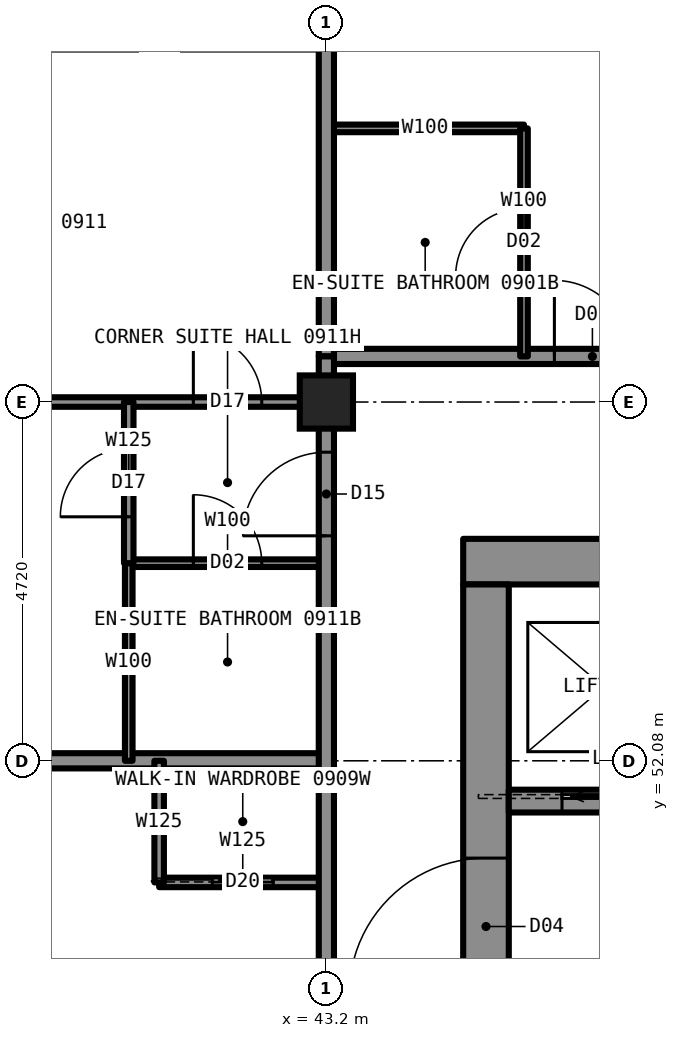
"""IFC4 building model, lengths in metres.
Left out: names, types, materials, properties, quantities, classifications, styles, units other than length and angle.
Written with IfcOpenShell. Run it as: python <this file> out.ifc"""

import sys

from ifc_helpers import new_model, si_unit, direction, frame, frame_2d, origin, origin_2d, place, context, subcontext, project, spatial, rectangle, hollow_rectangle, extrude, element, fill, save


model = new_model("IFC4")
c1 = context("Model", 3, precision=1e-05, world=origin(), true_north=direction((0.0, 1.0)))
c2 = subcontext(c1, "Body", "Model", "MODEL_VIEW")
j1 = project(units=[si_unit("LENGTHUNIT", "METRE"), si_unit("PLANEANGLEUNIT", "RADIAN")], contexts=[c1])
p1 = place(None, origin())
s1 = spatial("IfcSite", under=j1, at=p1, CompositionType="ELEMENT")
p2 = place(p1, origin())
s2 = spatial("IfcBuilding", under=s1, at=p2, CompositionType="ELEMENT")
p3 = place(p2, frame((0.0, 0.0, 39.0)))
s3 = spatial("IfcBuildingStorey", under=s2, at=p3, CompositionType="ELEMENT", Elevation=39.0)
p4 = place(p3, frame((43.2, 56.8, 0.0), z_axis=(0.0, 0.0, 1.0), x_axis=(1.0, 0.0, 0.0)))
e1 = element("IfcColumn", 1, at=p4, inside=s3, PredefinedType="COLUMN", context=c2, shape_type="SweptSolid", body=[
    extrude(hollow_rectangle(XDim=0.7, YDim=0.7, WallThickness=0.06, at=origin_2d()), origin(), (0.0, 0.0, 1.0), 3.5),
])
p5 = place(p3, frame((45.0, 54.7, 0.0), z_axis=(0.0, 0.0, 1.0), x_axis=(1.0, 0.0, 0.0)))
e2 = element("IfcWall", 2, at=p5, inside=s3, PredefinedType="SHEAR", context=c2, shape_type="SweptSolid", body=[
    extrude(rectangle(XDim=20.0, YDim=0.6, at=frame_2d((10.0, 0.0))), origin(), (0.0, 0.0, 1.0), 3.5),
])
p6 = place(p3, frame((45.3, 35.6, 0.0), z_axis=(0.0, 0.0, 1.0), x_axis=(0.0, 1.0, 0.0)))
e3 = element("IfcWall", 3, at=p6, inside=s3, PredefinedType="SHEAR", context=c2, shape_type="SweptSolid", body=[
    extrude(rectangle(XDim=18.8, YDim=0.6, at=frame_2d((9.4, 0.0))), origin(), (0.0, 0.0, 1.0), 3.5),
])
p7 = place(p6, frame((13.4, 0.0, 0.0)))
e4 = element("IfcOpeningElement", 4, at=p7, cuts=e3, PredefinedType="OPENING", context=c2, shape_type="SweptSolid", body=[
    extrude(rectangle(XDim=1.8, YDim=2.2, at=frame_2d((0.9, 1.1))), frame((0.0, 0.31, 0.0), z_axis=(0.0, -1.0, 0.0), x_axis=(1.0, 0.0, 0.0)), (0.0, 0.0, 1.0), 0.62),
])
p8 = place(p6, frame((3.6, 0.0, 0.0)))
e5 = element("IfcOpeningElement", 5, at=p8, cuts=e3, PredefinedType="OPENING", context=c2, shape_type="SweptSolid", body=[
    extrude(rectangle(XDim=1.8, YDim=2.2, at=frame_2d((0.9, 1.1))), frame((0.0, 0.31, 0.0), z_axis=(0.0, -1.0, 0.0), x_axis=(1.0, 0.0, 0.0)), (0.0, 0.0, 1.0), 0.62),
])
p9 = place(p6, frame((6.4, 0.0, 0.0)))
e6 = element("IfcOpeningElement", 6, at=p9, cuts=e3, PredefinedType="OPENING", context=c2, shape_type="SweptSolid", body=[
    extrude(rectangle(XDim=1.2, YDim=2.2, at=frame_2d((0.6, 1.1))), frame((0.0, 0.31, 0.0), z_axis=(0.0, -1.0, 0.0), x_axis=(1.0, 0.0, 0.0)), (0.0, 0.0, 1.0), 0.62),
])
p10 = place(p3, frame((45.6, 51.55, 0.0), z_axis=(0.0, 0.0, 1.0), x_axis=(1.0, 0.0, 0.0)))
e7 = element("IfcWall", 7, at=p10, inside=s3, PredefinedType="SHEAR", context=c2, shape_type="SweptSolid", body=[
    extrude(rectangle(XDim=18.8, YDim=0.3, at=frame_2d((9.4, 0.0))), origin(), (0.0, 0.0, 1.0), 3.5),
])
p11 = place(p10, frame((0.7, 0.0, 0.0)))
e8 = element("IfcOpeningElement", 8, at=p11, cuts=e7, PredefinedType="OPENING", context=c2, shape_type="SweptSolid", body=[
    extrude(rectangle(XDim=1.1, YDim=2.2, at=frame_2d((0.55, 1.1))), frame((0.0, 0.16, 0.0), z_axis=(0.0, -1.0, 0.0), x_axis=(1.0, 0.0, 0.0)), (0.0, 0.0, 1.0), 0.32),
])
p12 = place(p10, frame((3.4, 0.0, 0.0)))
e9 = element("IfcOpeningElement", 9, at=p12, cuts=e7, PredefinedType="OPENING", context=c2, shape_type="SweptSolid", body=[
    extrude(rectangle(XDim=1.1, YDim=2.2, at=frame_2d((0.55, 1.1))), frame((0.0, 0.16, 0.0), z_axis=(0.0, -1.0, 0.0), x_axis=(1.0, 0.0, 0.0)), (0.0, 0.0, 1.0), 0.32),
])
p13 = place(p10, frame((6.1, 0.0, 0.0)))
e10 = element("IfcOpeningElement", 10, at=p13, cuts=e7, PredefinedType="OPENING", context=c2, shape_type="SweptSolid", body=[
    extrude(rectangle(XDim=1.1, YDim=2.2, at=frame_2d((0.55, 1.1))), frame((0.0, 0.16, 0.0), z_axis=(0.0, -1.0, 0.0), x_axis=(1.0, 0.0, 0.0)), (0.0, 0.0, 1.0), 0.32),
])
p14 = place(p10, frame((8.8, 0.0, 0.0)))
e11 = element("IfcOpeningElement", 11, at=p14, cuts=e7, PredefinedType="OPENING", context=c2, shape_type="SweptSolid", body=[
    extrude(rectangle(XDim=1.1, YDim=2.2, at=frame_2d((0.55, 1.1))), frame((0.0, 0.16, 0.0), z_axis=(0.0, -1.0, 0.0), x_axis=(1.0, 0.0, 0.0)), (0.0, 0.0, 1.0), 0.32),
])
p15 = place(p10, frame((11.6, 0.0, 0.0)))
e12 = element("IfcOpeningElement", 12, at=p15, cuts=e7, PredefinedType="OPENING", context=c2, shape_type="SweptSolid", body=[
    extrude(rectangle(XDim=1.1, YDim=2.2, at=frame_2d((0.55, 1.1))), frame((0.0, 0.16, 0.0), z_axis=(0.0, -1.0, 0.0), x_axis=(1.0, 0.0, 0.0)), (0.0, 0.0, 1.0), 0.32),
])
p16 = place(p10, frame((14.3, 0.0, 0.0)))
e13 = element("IfcOpeningElement", 13, at=p16, cuts=e7, PredefinedType="OPENING", context=c2, shape_type="SweptSolid", body=[
    extrude(rectangle(XDim=1.1, YDim=2.2, at=frame_2d((0.55, 1.1))), frame((0.0, 0.16, 0.0), z_axis=(0.0, -1.0, 0.0), x_axis=(1.0, 0.0, 0.0)), (0.0, 0.0, 1.0), 0.32),
])
p17 = place(p3, frame((33.3, 56.8, 0.0), z_axis=(0.0, 0.0, 1.0), x_axis=(1.0, 0.0, 0.0)))
e14 = element("IfcWall", 14, at=p17, inside=s3, PredefinedType="PARTITIONING", context=c2, shape_type="SweptSolid", body=[
    extrude(rectangle(XDim=9.9, YDim=0.125, at=frame_2d((4.95, 0.0))), origin(), (0.0, 0.0, 1.0), 2.573),
])
p18 = place(p17, frame((8.15, 0.0, 0.0)))
e15 = element("IfcOpeningElement", 15, at=p18, cuts=e14, PredefinedType="OPENING", context=c2, shape_type="SweptSolid", body=[
    extrude(rectangle(XDim=0.9, YDim=2.2, at=frame_2d((0.45, 1.1))), frame((0.0, 0.073, 0.0), z_axis=(0.0, -1.0, 0.0), x_axis=(1.0, 0.0, 0.0)), (0.0, 0.0, 1.0), 0.145),
])
p19 = place(p3, frame((43.2, 57.4, 0.0), z_axis=(0.0, 0.0, 1.0), x_axis=(1.0, 0.0, 0.0)))
e16 = element("IfcWall", 16, at=p19, inside=s3, PredefinedType="PARTITIONING", context=c2, shape_type="SweptSolid", body=[
    extrude(rectangle(XDim=23.6, YDim=0.2, at=frame_2d((11.8, 0.0))), origin(), (0.0, 0.0, 1.0), 3.33),
])
p20 = place(p19, frame((3.0, 0.0, 0.0)))
e17 = element("IfcOpeningElement", 17, at=p20, cuts=e16, PredefinedType="OPENING", context=c2, shape_type="SweptSolid", body=[
    extrude(rectangle(XDim=1.0, YDim=2.2, at=frame_2d((0.5, 1.1))), frame((0.0, 0.11, 0.0), z_axis=(0.0, -1.0, 0.0), x_axis=(1.0, 0.0, 0.0)), (0.0, 0.0, 1.0), 0.22),
])
p21 = place(p19, frame((11.29, 0.0, 0.0)))
e18 = element("IfcOpeningElement", 18, at=p21, cuts=e16, PredefinedType="OPENING", context=c2, shape_type="SweptSolid", body=[
    extrude(rectangle(XDim=1.1, YDim=2.2, at=frame_2d((0.55, 1.1))), frame((0.0, 0.11, 0.0), z_axis=(0.0, -1.0, 0.0), x_axis=(1.0, 0.0, 0.0)), (0.0, 0.0, 1.0), 0.22),
])
p22 = place(p3, frame((43.2, 60.4, 0.0), z_axis=(0.0, 0.0, 1.0), x_axis=(1.0, 0.0, 0.0)))
e19 = element("IfcWall", 19, at=p22, inside=s3, PredefinedType="PARTITIONING", context=c2, shape_type="SweptSolid", body=[
    extrude(rectangle(XDim=2.6, YDim=0.1, at=frame_2d((1.3, 0.0))), origin(), (0.0, 0.0, 1.0), 3.33),
])
p23 = place(p3, frame((41.0, 50.48, 0.0), z_axis=(0.0, 0.0, 1.0), x_axis=(1.0, 0.0, 0.0)))
e20 = element("IfcWall", 20, at=p23, inside=s3, PredefinedType="PARTITIONING", context=c2, shape_type="SweptSolid", body=[
    extrude(rectangle(XDim=2.2, YDim=0.125, at=frame_2d((1.1, 0.0))), origin(), (0.0, 0.0, 1.0), 3.33),
])
p24 = place(p23, frame((0.7, 0.0, 0.0)))
e21 = element("IfcOpeningElement", 21, at=p24, cuts=e20, PredefinedType="OPENING", context=c2, shape_type="SweptSolid", body=[
    extrude(rectangle(XDim=0.8, YDim=2.1, at=frame_2d((0.4, 1.05))), frame((0.0, 0.073, 0.0), z_axis=(0.0, -1.0, 0.0), x_axis=(1.0, 0.0, 0.0)), (0.0, 0.0, 1.0), 0.145),
])
p25 = place(p3, frame((33.3, 52.08, 0.0), z_axis=(0.0, 0.0, 1.0), x_axis=(1.0, 0.0, 0.0)))
e22 = element("IfcWall", 22, at=p25, inside=s3, PredefinedType="PARTITIONING", context=c2, shape_type="SweptSolid", body=[
    extrude(rectangle(XDim=9.9, YDim=0.2, at=frame_2d((4.95, 0.0))), origin(), (0.0, 0.0, 1.0), 2.573),
])
p26 = place(p3, frame((40.6, 54.68, 0.0), z_axis=(0.0, 0.0, 1.0), x_axis=(1.0, 0.0, 0.0)))
e23 = element("IfcWall", 23, at=p26, inside=s3, PredefinedType="PARTITIONING", context=c2, shape_type="SweptSolid", body=[
    extrude(rectangle(XDim=2.6, YDim=0.1, at=frame_2d((1.3, 0.0))), origin(), (0.0, 0.0, 1.0), 3.33),
])
p27 = place(p26, frame((0.85, 0.0, 0.0)))
e24 = element("IfcOpeningElement", 24, at=p27, cuts=e23, PredefinedType="OPENING", context=c2, shape_type="SweptSolid", body=[
    extrude(rectangle(XDim=0.9, YDim=2.1, at=frame_2d((0.45, 1.05))), frame((0.0, 0.06, 0.0), z_axis=(0.0, -1.0, 0.0), x_axis=(1.0, 0.0, 0.0)), (0.0, 0.0, 1.0), 0.12),
])
p28 = place(p3, frame((43.2, 33.2, 0.0), z_axis=(0.0, 0.0, 1.0), x_axis=(0.0, 1.0, 0.0)))
e25 = element("IfcWall", 25, at=p28, inside=s3, PredefinedType="PARTITIONING", context=c2, shape_type="SweptSolid", body=[
    extrude(rectangle(XDim=23.58, YDim=0.2, at=frame_2d((11.79, 0.0))), origin(), (0.0, 0.0, 1.0), 3.33),
])
p29 = place(p28, frame((7.27, 0.0, 0.0)))
e26 = element("IfcOpeningElement", 26, at=p29, cuts=e25, PredefinedType="OPENING", context=c2, shape_type="SweptSolid", body=[
    extrude(rectangle(XDim=1.0, YDim=2.2, at=frame_2d((0.5, 1.1))), frame((0.0, 0.11, 0.0), z_axis=(0.0, -1.0, 0.0), x_axis=(1.0, 0.0, 0.0)), (0.0, 0.0, 1.0), 0.22),
])
p30 = place(p28, frame((12.44, 0.0, 0.0)))
e27 = element("IfcOpeningElement", 27, at=p30, cuts=e25, PredefinedType="OPENING", context=c2, shape_type="SweptSolid", body=[
    extrude(rectangle(XDim=1.0, YDim=2.2, at=frame_2d((0.5, 1.1))), frame((0.0, 0.11, 0.0), z_axis=(0.0, -1.0, 0.0), x_axis=(1.0, 0.0, 0.0)), (0.0, 0.0, 1.0), 0.22),
])
p31 = place(p28, frame((21.84, 0.0, 0.0)))
e28 = element("IfcOpeningElement", 28, at=p31, cuts=e25, PredefinedType="OPENING", context=c2, shape_type="SweptSolid", body=[
    extrude(rectangle(XDim=1.1, YDim=2.2, at=frame_2d((0.55, 1.1))), frame((0.0, 0.11, 0.0), z_axis=(0.0, -1.0, 0.0), x_axis=(1.0, 0.0, 0.0)), (0.0, 0.0, 1.0), 0.22),
])
p32 = place(p28, frame((0.66, 0.0, 0.0)))
e29 = element("IfcOpeningElement", 29, at=p32, cuts=e25, PredefinedType="OPENING", context=c2, shape_type="SweptSolid", body=[
    extrude(rectangle(XDim=1.1, YDim=2.2, at=frame_2d((0.55, 1.1))), frame((0.0, 0.11, 0.0), z_axis=(0.0, -1.0, 0.0), x_axis=(1.0, 0.0, 0.0)), (0.0, 0.0, 1.0), 0.22),
])
p33 = place(p3, frame((43.2, 57.4, 0.0), z_axis=(0.0, 0.0, 1.0), x_axis=(0.0, 1.0, 0.0)))
e30 = element("IfcWall", 30, at=p33, inside=s3, PredefinedType="PARTITIONING", context=c2, shape_type="SweptSolid", body=[
    extrude(rectangle(XDim=9.3, YDim=0.2, at=frame_2d((4.65, 0.0))), origin(), (0.0, 0.0, 1.0), 2.573),
])
p34 = place(p3, frame((41.0, 50.48, 0.0), z_axis=(0.0, 0.0, 1.0), x_axis=(0.0, 1.0, 0.0)))
e31 = element("IfcWall", 31, at=p34, inside=s3, PredefinedType="PARTITIONING", context=c2, shape_type="SweptSolid", body=[
    extrude(rectangle(XDim=1.6, YDim=0.125, at=frame_2d((0.8, 0.0))), origin(), (0.0, 0.0, 1.0), 3.33),
])
p35 = place(p3, frame((40.6, 52.08, 0.0), z_axis=(0.0, 0.0, 1.0), x_axis=(0.0, 1.0, 0.0)))
e32 = element("IfcWall", 32, at=p35, inside=s3, PredefinedType="PARTITIONING", context=c2, shape_type="SweptSolid", body=[
    extrude(rectangle(XDim=2.6, YDim=0.1, at=frame_2d((1.3, 0.0))), origin(), (0.0, 0.0, 1.0), 3.33),
])
p36 = place(p3, frame((40.6, 54.68, 0.0), z_axis=(0.0, 0.0, 1.0), x_axis=(0.0, 1.0, 0.0)))
e33 = element("IfcWall", 33, at=p36, inside=s3, PredefinedType="PARTITIONING", context=c2, shape_type="SweptSolid", body=[
    extrude(rectangle(XDim=2.12, YDim=0.125, at=frame_2d((1.06, 0.0))), origin(), (0.0, 0.0, 1.0), 3.33),
])
p37 = place(p36, frame((0.61, 0.0, 0.0)))
e34 = element("IfcOpeningElement", 34, at=p37, cuts=e33, PredefinedType="OPENING", context=c2, shape_type="SweptSolid", body=[
    extrude(rectangle(XDim=0.9, YDim=2.2, at=frame_2d((0.45, 1.1))), frame((0.0, 0.073, 0.0), z_axis=(0.0, -1.0, 0.0), x_axis=(1.0, 0.0, 0.0)), (0.0, 0.0, 1.0), 0.145),
])
p38 = place(p3, frame((45.8, 57.4, 0.0), z_axis=(0.0, 0.0, 1.0), x_axis=(0.0, 1.0, 0.0)))
e35 = element("IfcWall", 35, at=p38, inside=s3, PredefinedType="PARTITIONING", context=c2, shape_type="SweptSolid", body=[
    extrude(rectangle(XDim=3.0, YDim=0.1, at=frame_2d((1.5, 0.0))), origin(), (0.0, 0.0, 1.0), 3.33),
])
p39 = place(p38, frame((1.05, 0.0, 0.0)))
e36 = element("IfcOpeningElement", 36, at=p39, cuts=e35, PredefinedType="OPENING", context=c2, shape_type="SweptSolid", body=[
    extrude(rectangle(XDim=0.9, YDim=2.1, at=frame_2d((0.45, 1.05))), frame((0.0, 0.06, 0.0), z_axis=(0.0, -1.0, 0.0), x_axis=(1.0, 0.0, 0.0)), (0.0, 0.0, 1.0), 0.12),
])
p40 = place(p3, frame((43.2, 56.78, 0.0), z_axis=(0.0, 0.0, 1.0), x_axis=(0.0, 1.0, 0.0)))
e37 = element("IfcWall", 37, at=p40, inside=s3, PredefinedType="PARTITIONING", context=c2, shape_type="SweptSolid", body=[
    extrude(rectangle(XDim=0.62, YDim=0.2, at=frame_2d((0.31, 0.0))), origin(), (0.0, 0.0, 1.0), 2.573),
])
p41 = place(p20, origin())
e38 = element("IfcDoor", 38, at=p41, inside=s3, OperationType="SINGLE_SWING_LEFT", PredefinedType="DOOR", context=c2, shape_type="SweptSolid", body=[
    extrude(rectangle(XDim=1.0, YDim=2.2, at=frame_2d((0.5, 1.1))), frame((0.0, 0.025, 0.0), z_axis=(0.0, -1.0, 0.0), x_axis=(1.0, 0.0, 0.0)), (0.0, 0.0, 1.0), 0.05),
])
fill(e17, e38)
p42 = place(p39, origin())
e39 = element("IfcDoor", 39, at=p42, inside=s3, OperationType="SINGLE_SWING_RIGHT", PredefinedType="DOOR", context=c2, shape_type="SweptSolid", body=[
    extrude(rectangle(XDim=0.9, YDim=2.1, at=frame_2d((0.45, 1.05))), frame((0.0, 0.025, 0.0), z_axis=(0.0, -1.0, 0.0), x_axis=(1.0, 0.0, 0.0)), (0.0, 0.0, 1.0), 0.05),
])
fill(e36, e39)
p43 = place(p24, origin())
e40 = element("IfcDoor", 40, at=p43, inside=s3, OperationType="SLIDING_TO_LEFT", PredefinedType="DOOR", context=c2, shape_type="SweptSolid", body=[
    extrude(rectangle(XDim=0.8, YDim=2.1, at=frame_2d((0.4, 1.05))), frame((0.0, 0.025, 0.0), z_axis=(0.0, -1.0, 0.0), x_axis=(1.0, 0.0, 0.0)), (0.0, 0.0, 1.0), 0.05),
])
fill(e21, e40)
p44 = place(p18, origin())
e41 = element("IfcDoor", 41, at=p44, inside=s3, OperationType="SINGLE_SWING_LEFT", PredefinedType="DOOR", context=c2, shape_type="SweptSolid", body=[
    extrude(rectangle(XDim=0.9, YDim=2.2, at=frame_2d((0.45, 1.1))), frame((0.0, 0.025, 0.0), z_axis=(0.0, -1.0, 0.0), x_axis=(1.0, 0.0, 0.0)), (0.0, 0.0, 1.0), 0.05),
])
fill(e15, e41)
p45 = place(p27, origin())
e42 = element("IfcDoor", 42, at=p45, inside=s3, OperationType="SINGLE_SWING_RIGHT", PredefinedType="DOOR", context=c2, shape_type="SweptSolid", body=[
    extrude(rectangle(XDim=0.9, YDim=2.1, at=frame_2d((0.45, 1.05))), frame((0.0, 0.025, 0.0), z_axis=(0.0, -1.0, 0.0), x_axis=(1.0, 0.0, 0.0)), (0.0, 0.0, 1.0), 0.05),
])
fill(e24, e42)
p46 = place(p31, origin())
e43 = element("IfcDoor", 43, at=p46, inside=s3, OperationType="SINGLE_SWING_LEFT", PredefinedType="DOOR", context=c2, shape_type="SweptSolid", body=[
    extrude(rectangle(XDim=1.1, YDim=2.2, at=frame_2d((0.55, 1.1))), frame((0.0, 0.025, 0.0), z_axis=(0.0, -1.0, 0.0), x_axis=(1.0, 0.0, 0.0)), (0.0, 0.0, 1.0), 0.05),
])
fill(e28, e43)
p47 = place(p37, origin())
e44 = element("IfcDoor", 44, at=p47, inside=s3, OperationType="SINGLE_SWING_LEFT", PredefinedType="DOOR", context=c2, shape_type="SweptSolid", body=[
    extrude(rectangle(XDim=0.9, YDim=2.2, at=frame_2d((0.45, 1.1))), frame((0.0, 0.025, 0.0), z_axis=(0.0, -1.0, 0.0), x_axis=(1.0, 0.0, 0.0)), (0.0, 0.0, 1.0), 0.05),
])
fill(e34, e44)
p48 = place(p7, origin())
e45 = element("IfcDoor", 45, at=p48, inside=s3, OperationType="DOUBLE_DOOR_SINGLE_SWING", PredefinedType="DOOR", context=c2, shape_type="SweptSolid", body=[
    extrude(rectangle(XDim=1.8, YDim=2.2, at=frame_2d((0.9, 1.1))), frame((0.0, 0.025, 0.0), z_axis=(0.0, -1.0, 0.0), x_axis=(1.0, 0.0, 0.0)), (0.0, 0.0, 1.0), 0.05),
])
fill(e4, e45)
p49 = place(p11, origin())
e46 = element("IfcDoor", 46, at=p49, inside=s3, OperationType="SLIDING_TO_LEFT", PredefinedType="DOOR", context=c2, shape_type="SweptSolid", body=[
    extrude(rectangle(XDim=1.1, YDim=2.2, at=frame_2d((0.55, 1.1))), frame((0.0, 0.025, 0.0), z_axis=(0.0, -1.0, 0.0), x_axis=(1.0, 0.0, 0.0)), (0.0, 0.0, 1.0), 0.05),
])
fill(e8, e46)
save(model, sys.argv[1])
